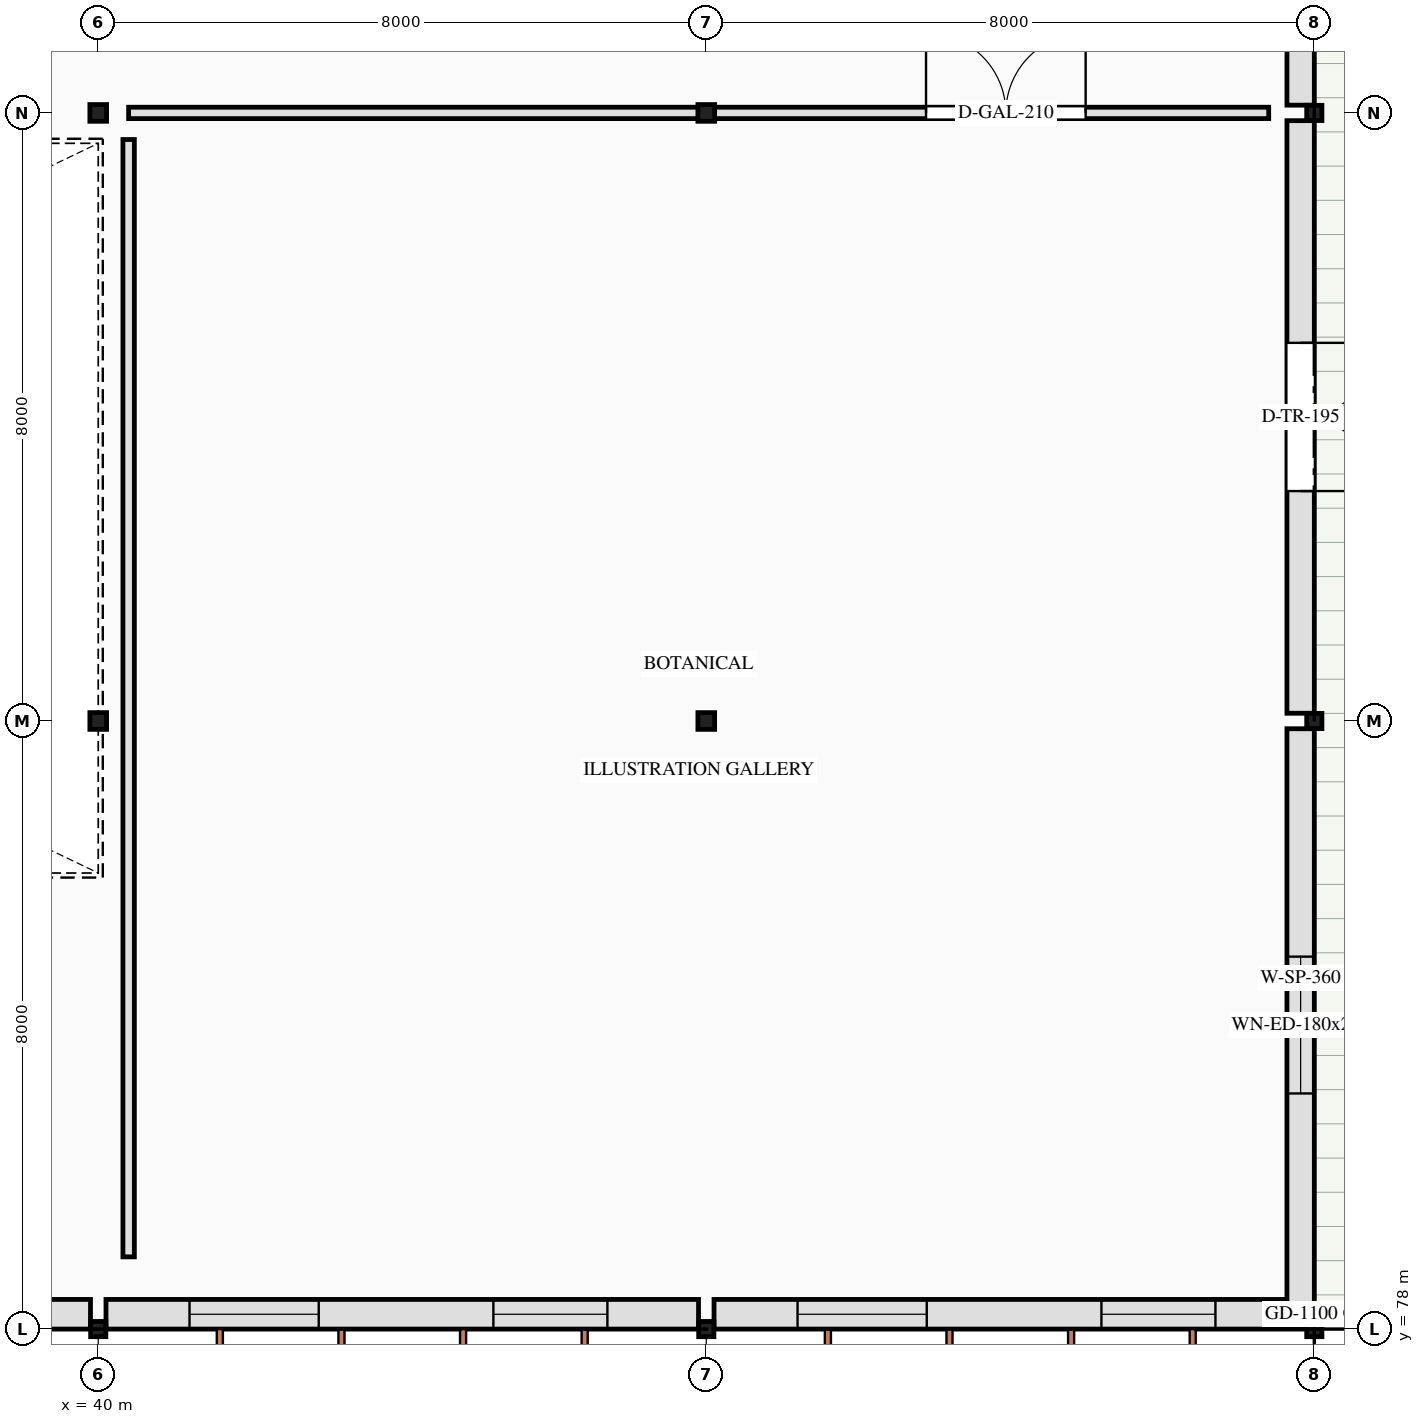
"""IFC4 building model, lengths in metres.
Left out: names, types, materials, properties, quantities, classifications, styles, units other than length and angle.
Written with IfcOpenShell. Run it as: python <this file> out.ifc"""

import sys

from ifc_helpers import new_model, si_unit, direction, frame, frame_2d, origin, origin_2d, place, context, subcontext, project, spatial, rectangle, i_section, extrude, element, fill, save


model = new_model("IFC4")
c1 = context("Model", 3, precision=1e-05, world=origin(), true_north=direction((0.0, 1.0)))
c2 = subcontext(c1, "Body", "Model", "MODEL_VIEW")
j1 = project(units=[si_unit("LENGTHUNIT", "METRE"), si_unit("PLANEANGLEUNIT", "RADIAN")], contexts=[c1])
p1 = place(None, origin())
s1 = spatial("IfcSite", under=j1, at=p1, CompositionType="ELEMENT")
p2 = place(p1, origin())
s2 = spatial("IfcBuilding", under=s1, at=p2, CompositionType="ELEMENT")
p3 = place(p2, frame((0.0, 0.0, 21.8)))
s3 = spatial("IfcBuildingStorey", under=s2, at=p3, CompositionType="ELEMENT", Elevation=21.8)
p4 = place(p3, frame((40.0, 78.0, 0.0), z_axis=(0.0, 0.0, 1.0), x_axis=(1.0, 0.0, 0.0)))
e1 = element("IfcColumn", 1, at=p4, inside=s3, PredefinedType="COLUMN", context=c2, shape_type="SweptSolid", body=[
    extrude(i_section(OverallWidth=0.2, OverallDepth=0.2, WebThickness=0.009, FlangeThickness=0.015, FilletRadius=0.018, at=origin_2d()), origin(), (0.0, 0.0, 1.0), 4.2),
])
for number, where, z_axis, x_axis in (
    (2, (40.0, 86.0, 0.0), (0.0, 0.0, 1.0), (1.0, 0.0, 0.0)),
    (3, (40.0, 94.0, 0.0), (0.0, 0.0, 1.0), (1.0, 0.0, 0.0)),
):
    element("IfcColumn", number, at=place(p3, frame(where, z_axis=z_axis, x_axis=x_axis)), inside=s3, PredefinedType="COLUMN", context=c2, shape_type="SweptSolid", body=[
        extrude(i_section(OverallWidth=0.22, OverallDepth=0.22, WebThickness=0.01, FlangeThickness=0.016, FilletRadius=0.018, at=origin_2d()), origin(), (0.0, 0.0, 1.0), 4.2),
    ])
p5 = place(p3, frame((48.0, 78.0, 0.0), z_axis=(0.0, 0.0, 1.0), x_axis=(1.0, 0.0, 0.0)))
e4 = element("IfcColumn", 4, at=p5, inside=s3, PredefinedType="COLUMN", context=c2, shape_type="SweptSolid", body=[
    extrude(i_section(OverallWidth=0.2, OverallDepth=0.2, WebThickness=0.009, FlangeThickness=0.015, FilletRadius=0.018, at=origin_2d()), origin(), (0.0, 0.0, 1.0), 4.2),
])
for number, where, z_axis, x_axis in (
    (5, (48.0, 86.0, 0.0), (0.0, 0.0, 1.0), (1.0, 0.0, 0.0)),
    (6, (48.0, 94.0, 0.0), (0.0, 0.0, 1.0), (1.0, 0.0, 0.0)),
):
    element("IfcColumn", number, at=place(p3, frame(where, z_axis=z_axis, x_axis=x_axis)), inside=s3, PredefinedType="COLUMN", context=c2, shape_type="SweptSolid", body=[
        extrude(i_section(OverallWidth=0.22, OverallDepth=0.22, WebThickness=0.01, FlangeThickness=0.016, FilletRadius=0.018, at=origin_2d()), origin(), (0.0, 0.0, 1.0), 4.2),
    ])
for number, where, z_axis, x_axis in (
    (7, (56.0, 78.0, 0.0), (0.0, 0.0, 1.0), (1.0, 0.0, 0.0)),
    (8, (56.0, 86.0, 0.0), (0.0, 0.0, 1.0), (1.0, 0.0, 0.0)),
    (9, (56.0, 94.0, 0.0), (0.0, 0.0, 1.0), (1.0, 0.0, 0.0)),
):
    element("IfcColumn", number, at=place(p3, frame(where, z_axis=z_axis, x_axis=x_axis)), inside=s3, PredefinedType="COLUMN", context=c2, shape_type="SweptSolid", body=[
        extrude(i_section(OverallWidth=0.2, OverallDepth=0.2, WebThickness=0.009, FlangeThickness=0.015, FilletRadius=0.018, at=origin_2d()), origin(), (0.0, 0.0, 1.0), 4.2),
    ])
p6 = place(p3, frame((39.898, 78.195, 0.0), z_axis=(0.0, 0.0, 1.0), x_axis=(-1.0, 0.0, 0.0)))
e10 = element("IfcWall", 10, at=p6, inside=s3, PredefinedType="SOLIDWALL", context=c2, shape_type="SweptSolid", body=[
    extrude(rectangle(XDim=7.796, YDim=0.39, at=frame_2d((3.898, 0.0))), origin(), (0.0, 0.0, 1.0), 3.92),
])
p7 = place(p6, frame((1.199, 0.0, 0.85)))
e11 = element("IfcOpeningElement", 11, at=p7, cuts=e10, PredefinedType="OPENING", context=c2, shape_type="SweptSolid", body=[
    extrude(rectangle(XDim=1.5, YDim=2.4, at=frame_2d((0.75, 1.2))), frame((0.0, 0.205, 0.0), z_axis=(0.0, -1.0, 0.0), x_axis=(1.0, 0.0, 0.0)), (0.0, 0.0, 1.0), 0.41),
])
p8 = place(p6, frame((4.997, 0.0, 0.85)))
e12 = element("IfcOpeningElement", 12, at=p8, cuts=e10, PredefinedType="OPENING", context=c2, shape_type="SweptSolid", body=[
    extrude(rectangle(XDim=1.7, YDim=2.4, at=frame_2d((0.85, 1.2))), frame((0.0, 0.205, 0.0), z_axis=(0.0, -1.0, 0.0), x_axis=(1.0, 0.0, 0.0)), (0.0, 0.0, 1.0), 0.41),
])
p9 = place(p3, frame((47.898, 78.195, 0.0), z_axis=(0.0, 0.0, 1.0), x_axis=(-1.0, 0.0, 0.0)))
e13 = element("IfcWall", 13, at=p9, inside=s3, PredefinedType="SOLIDWALL", context=c2, shape_type="SweptSolid", body=[
    extrude(rectangle(XDim=7.796, YDim=0.39, at=frame_2d((3.898, 0.0))), origin(), (0.0, 0.0, 1.0), 3.92),
])
p10 = place(p9, frame((1.199, 0.0, 0.85)))
e14 = element("IfcOpeningElement", 14, at=p10, cuts=e13, PredefinedType="OPENING", context=c2, shape_type="SweptSolid", body=[
    extrude(rectangle(XDim=1.5, YDim=2.4, at=frame_2d((0.75, 1.2))), frame((0.0, 0.205, 0.0), z_axis=(0.0, -1.0, 0.0), x_axis=(1.0, 0.0, 0.0)), (0.0, 0.0, 1.0), 0.41),
])
p11 = place(p9, frame((4.997, 0.0, 0.85)))
e15 = element("IfcOpeningElement", 15, at=p11, cuts=e13, PredefinedType="OPENING", context=c2, shape_type="SweptSolid", body=[
    extrude(rectangle(XDim=1.7, YDim=2.4, at=frame_2d((0.85, 1.2))), frame((0.0, 0.205, 0.0), z_axis=(0.0, -1.0, 0.0), x_axis=(1.0, 0.0, 0.0)), (0.0, 0.0, 1.0), 0.41),
])
p12 = place(p3, frame((55.898, 78.195, 0.0), z_axis=(0.0, 0.0, 1.0), x_axis=(-1.0, 0.0, 0.0)))
e16 = element("IfcWall", 16, at=p12, inside=s3, PredefinedType="SOLIDWALL", context=c2, shape_type="SweptSolid", body=[
    extrude(rectangle(XDim=7.796, YDim=0.39, at=frame_2d((3.898, 0.0))), origin(), (0.0, 0.0, 1.0), 3.92),
])
p13 = place(p12, frame((1.199, 0.0, 0.85)))
e17 = element("IfcOpeningElement", 17, at=p13, cuts=e16, PredefinedType="OPENING", context=c2, shape_type="SweptSolid", body=[
    extrude(rectangle(XDim=1.5, YDim=2.4, at=frame_2d((0.75, 1.2))), frame((0.0, 0.205, 0.0), z_axis=(0.0, -1.0, 0.0), x_axis=(1.0, 0.0, 0.0)), (0.0, 0.0, 1.0), 0.41),
])
p14 = place(p12, frame((4.997, 0.0, 0.85)))
e18 = element("IfcOpeningElement", 18, at=p14, cuts=e16, PredefinedType="OPENING", context=c2, shape_type="SweptSolid", body=[
    extrude(rectangle(XDim=1.7, YDim=2.4, at=frame_2d((0.85, 1.2))), frame((0.0, 0.205, 0.0), z_axis=(0.0, -1.0, 0.0), x_axis=(1.0, 0.0, 0.0)), (0.0, 0.0, 1.0), 0.41),
])
p15 = place(p3, frame((55.82, 85.898, 0.0), z_axis=(0.0, 0.0, 1.0), x_axis=(0.0, -1.0, 0.0)))
e19 = element("IfcWall", 19, at=p15, inside=s3, PredefinedType="ELEMENTEDWALL", context=c2, shape_type="SweptSolid", body=[
    extrude(rectangle(XDim=7.796, YDim=0.36, at=frame_2d((3.898, 0.0))), origin(), (0.0, 0.0, 1.0), 3.92),
])
p16 = place(p15, frame((2.998, 0.0, 0.85)))
e20 = element("IfcOpeningElement", 20, at=p16, cuts=e19, PredefinedType="OPENING", context=c2, shape_type="SweptSolid", body=[
    extrude(rectangle(XDim=1.8, YDim=2.1, at=frame_2d((0.9, 1.05))), frame((0.0, 0.19, 0.0), z_axis=(0.0, -1.0, 0.0), x_axis=(1.0, 0.0, 0.0)), (0.0, 0.0, 1.0), 0.38),
])
p17 = place(p3, frame((55.82, 93.898, 0.0), z_axis=(0.0, 0.0, 1.0), x_axis=(0.0, -1.0, 0.0)))
e21 = element("IfcWall", 21, at=p17, inside=s3, PredefinedType="ELEMENTEDWALL", context=c2, shape_type="SweptSolid", body=[
    extrude(rectangle(XDim=7.796, YDim=0.36, at=frame_2d((3.898, 0.0))), origin(), (0.0, 0.0, 1.0), 3.92),
])
p18 = place(p17, frame((2.923, 0.0, 0.0)))
e22 = element("IfcOpeningElement", 22, at=p18, cuts=e21, PredefinedType="OPENING", context=c2, shape_type="SweptSolid", body=[
    extrude(rectangle(XDim=1.95, YDim=2.35, at=frame_2d((0.975, 1.175))), frame((0.0, 0.19, 0.0), z_axis=(0.0, -1.0, 0.0), x_axis=(1.0, 0.0, 0.0)), (0.0, 0.0, 1.0), 0.38),
])
p19 = place(p3, frame((55.82, 101.898, 0.0), z_axis=(0.0, 0.0, 1.0), x_axis=(0.0, -1.0, 0.0)))
e23 = element("IfcWall", 23, at=p19, inside=s3, PredefinedType="ELEMENTEDWALL", context=c2, shape_type="SweptSolid", body=[
    extrude(rectangle(XDim=7.796, YDim=0.36, at=frame_2d((3.898, 0.0))), origin(), (0.0, 0.0, 1.0), 3.92),
])
p20 = place(p19, frame((2.998, 0.0, 0.85)))
e24 = element("IfcOpeningElement", 24, at=p20, cuts=e23, PredefinedType="OPENING", context=c2, shape_type="SweptSolid", body=[
    extrude(rectangle(XDim=1.8, YDim=2.1, at=frame_2d((0.9, 1.05))), frame((0.0, 0.19, 0.0), z_axis=(0.0, -1.0, 0.0), x_axis=(1.0, 0.0, 0.0)), (0.0, 0.0, 1.0), 0.38),
])
p21 = place(p3, frame((40.4, 94.0, 0.0), z_axis=(0.0, 0.0, 1.0), x_axis=(1.0, 0.0, 0.0)))
e25 = element("IfcWall", 25, at=p21, inside=s3, PredefinedType="PARTITIONING", context=c2, shape_type="SweptSolid", body=[
    extrude(rectangle(XDim=15.0, YDim=0.15, at=frame_2d((7.5, 0.0))), origin(), (0.0, 0.0, 1.0), 3.92),
])
p22 = place(p21, frame((10.491, 0.0, 0.0)))
e26 = element("IfcOpeningElement", 26, at=p22, cuts=e25, PredefinedType="OPENING", context=c2, shape_type="SweptSolid", body=[
    extrude(rectangle(XDim=2.1, YDim=2.6, at=frame_2d((1.05, 1.3))), frame((0.0, 0.085, 0.0), z_axis=(0.0, -1.0, 0.0), x_axis=(1.0, 0.0, 0.0)), (0.0, 0.0, 1.0), 0.17),
])
p23 = place(p3, frame((40.4, 78.95, 0.0), z_axis=(0.0, 0.0, 1.0), x_axis=(0.0, 1.0, 0.0)))
e27 = element("IfcWall", 27, at=p23, inside=s3, PredefinedType="PARTITIONING", context=c2, shape_type="SweptSolid", body=[
    extrude(rectangle(XDim=14.7, YDim=0.15, at=frame_2d((7.35, 0.0))), origin(), (0.0, 0.0, 1.0), 3.92),
])
p24 = place(p10, origin())
e28 = element("IfcWindow", 28, at=p24, inside=s3, PartitioningType="SINGLE_PANEL", PredefinedType="WINDOW", context=c2, shape_type="SweptSolid", body=[
    extrude(rectangle(XDim=1.5, YDim=2.4, at=frame_2d((0.75, 1.2))), frame((0.0, 0.03, 0.0), z_axis=(0.0, -1.0, 0.0), x_axis=(1.0, 0.0, 0.0)), (0.0, 0.0, 1.0), 0.06),
])
fill(e14, e28)
p25 = place(p11, origin())
e29 = element("IfcWindow", 29, at=p25, inside=s3, PartitioningType="DOUBLE_PANEL_VERTICAL", PredefinedType="WINDOW", context=c2, shape_type="SweptSolid", body=[
    extrude(rectangle(XDim=1.7, YDim=2.4, at=frame_2d((0.85, 1.2))), frame((0.0, 0.03, 0.0), z_axis=(0.0, -1.0, 0.0), x_axis=(1.0, 0.0, 0.0)), (0.0, 0.0, 1.0), 0.06),
])
fill(e15, e29)
p26 = place(p13, origin())
e30 = element("IfcWindow", 30, at=p26, inside=s3, PartitioningType="SINGLE_PANEL", PredefinedType="WINDOW", context=c2, shape_type="SweptSolid", body=[
    extrude(rectangle(XDim=1.5, YDim=2.4, at=frame_2d((0.75, 1.2))), frame((0.0, 0.03, 0.0), z_axis=(0.0, -1.0, 0.0), x_axis=(1.0, 0.0, 0.0)), (0.0, 0.0, 1.0), 0.06),
])
fill(e17, e30)
p27 = place(p14, origin())
e31 = element("IfcWindow", 31, at=p27, inside=s3, PartitioningType="DOUBLE_PANEL_VERTICAL", PredefinedType="WINDOW", context=c2, shape_type="SweptSolid", body=[
    extrude(rectangle(XDim=1.7, YDim=2.4, at=frame_2d((0.85, 1.2))), frame((0.0, 0.03, 0.0), z_axis=(0.0, -1.0, 0.0), x_axis=(1.0, 0.0, 0.0)), (0.0, 0.0, 1.0), 0.06),
])
fill(e18, e31)
p28 = place(p16, origin())
e32 = element("IfcWindow", 32, at=p28, inside=s3, PartitioningType="DOUBLE_PANEL_VERTICAL", PredefinedType="WINDOW", context=c2, shape_type="SweptSolid", body=[
    extrude(rectangle(XDim=1.8, YDim=2.1, at=frame_2d((0.9, 1.05))), frame((0.0, 0.03, 0.0), z_axis=(0.0, -1.0, 0.0), x_axis=(1.0, 0.0, 0.0)), (0.0, 0.0, 1.0), 0.06),
])
fill(e20, e32)
p29 = place(p18, origin())
e33 = element("IfcDoor", 33, at=p29, inside=s3, OperationType="DOUBLE_DOOR_SINGLE_SWING", PredefinedType="DOOR", context=c2, shape_type="SweptSolid", body=[
    extrude(rectangle(XDim=1.95, YDim=2.35, at=frame_2d((0.975, 1.175))), frame((0.0, 0.025, 0.0), z_axis=(0.0, -1.0, 0.0), x_axis=(1.0, 0.0, 0.0)), (0.0, 0.0, 1.0), 0.05),
])
fill(e22, e33)
p30 = place(p22, origin())
e34 = element("IfcDoor", 34, at=p30, inside=s3, OperationType="DOUBLE_DOOR_SINGLE_SWING", PredefinedType="DOOR", context=c2, shape_type="SweptSolid", body=[
    extrude(rectangle(XDim=2.1, YDim=2.6, at=frame_2d((1.05, 1.3))), frame((0.0, 0.025, 0.0), z_axis=(0.0, -1.0, 0.0), x_axis=(1.0, 0.0, 0.0)), (0.0, 0.0, 1.0), 0.05),
])
fill(e26, e34)
save(model, sys.argv[1])
